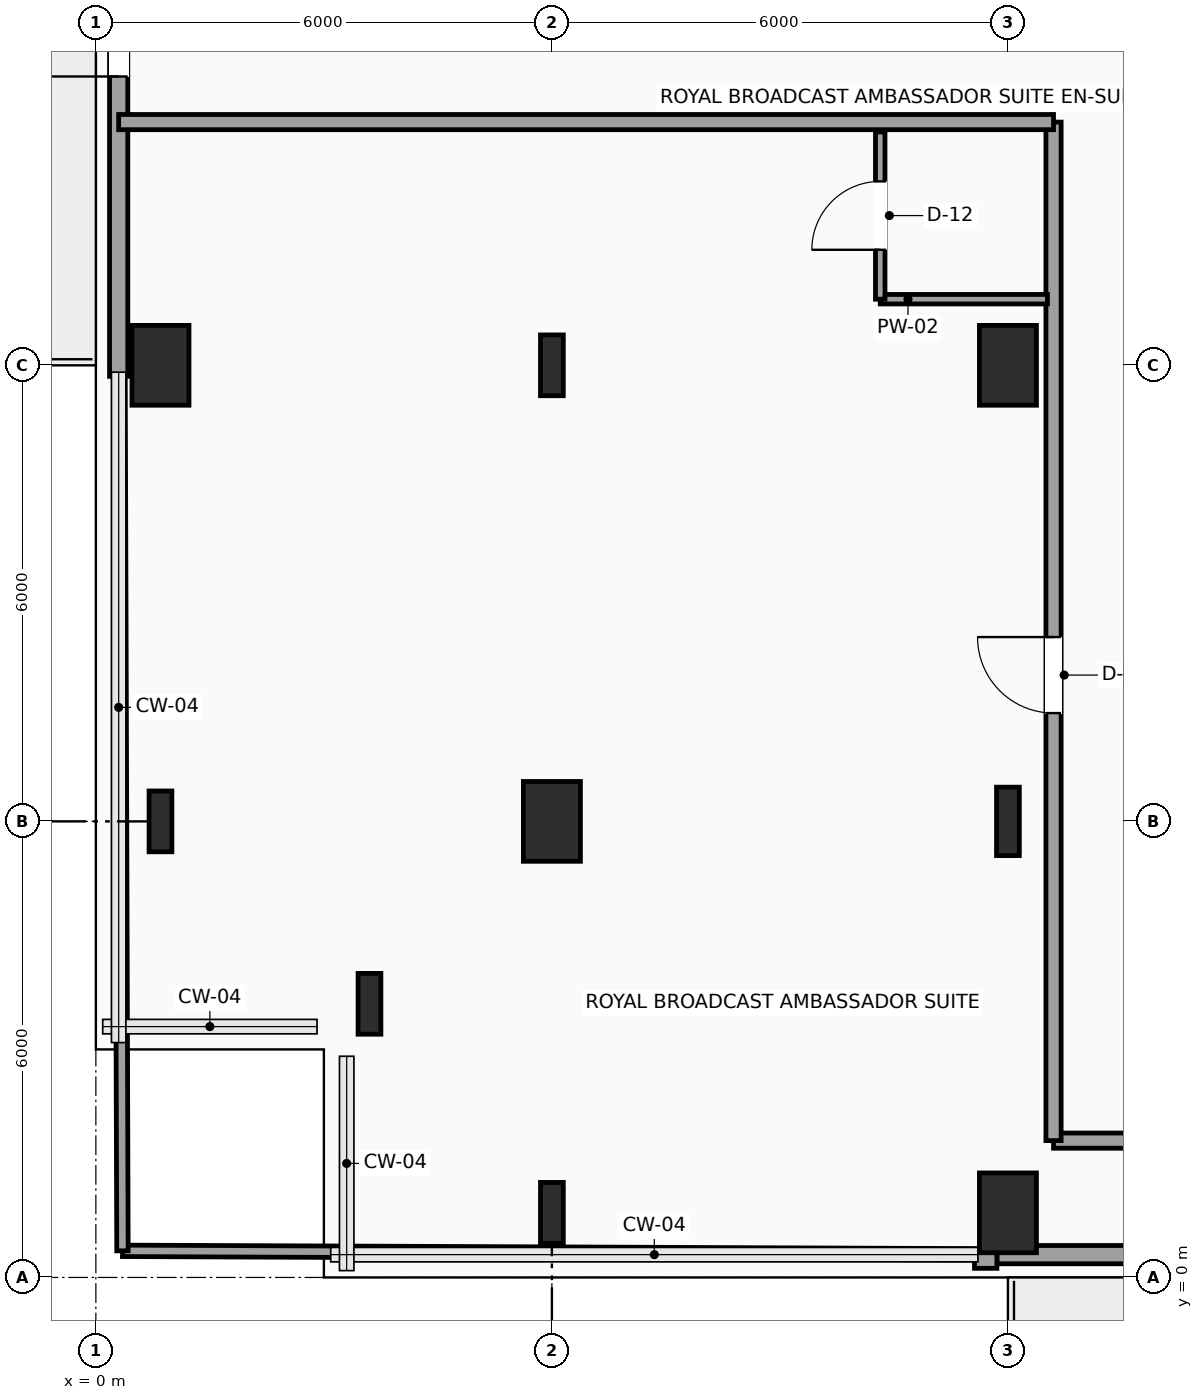
"""IFC4 building model, lengths in metres.
Left out: names, types, materials, properties, quantities, classifications, styles, units other than length and angle.
Written with IfcOpenShell. Run it as: python <this file> out.ifc"""

import sys

from ifc_helpers import new_model, si_unit, direction, frame, frame_2d, origin, origin_2d, place, context, subcontext, project, spatial, rectangle, i_section, extrude, element, fill, save


model = new_model("IFC4")
c1 = context("Model", 3, precision=1e-05, world=origin(), true_north=direction((0.0, 1.0)))
c2 = subcontext(c1, "Body", "Model", "MODEL_VIEW")
j1 = project(units=[si_unit("LENGTHUNIT", "METRE"), si_unit("PLANEANGLEUNIT", "RADIAN")], contexts=[c1])
p1 = place(None, origin())
s1 = spatial("IfcSite", under=j1, at=p1, CompositionType="ELEMENT")
p2 = place(p1, origin())
s2 = spatial("IfcBuilding", under=s1, at=p2, CompositionType="ELEMENT")
p3 = place(p2, frame((0.0, 0.0, 219.9)))
s3 = spatial("IfcBuildingStorey", under=s2, at=p3, CompositionType="ELEMENT", Elevation=219.9)
for number, where, z_axis, x_axis in (
    (1, (3.6, 3.6, 0.0), (0.0, 0.0, 1.0), (1.0, 0.0, 0.0)),
    (2, (0.85, 6.0, 0.0), (0.0, 0.0, 1.0), (1.0, 0.0, 0.0)),
):
    element("IfcColumn", number, at=place(p3, frame(where, z_axis=z_axis, x_axis=x_axis)), inside=s3, PredefinedType="COLUMN", context=c2, shape_type="SweptSolid", body=[
        extrude(i_section(OverallWidth=0.3, OverallDepth=0.8, WebThickness=0.018, FlangeThickness=0.033, FilletRadius=0.03, at=origin_2d()), origin(), (0.0, 0.0, 1.0), 3.75),
    ])
p4 = place(p3, frame((0.85, 12.0, 0.0), z_axis=(0.0, 0.0, 1.0), x_axis=(1.0, 0.0, 0.0)))
e3 = element("IfcColumn", 3, at=p4, inside=s3, PredefinedType="COLUMN", context=c2, shape_type="SweptSolid", body=[
    extrude(rectangle(XDim=0.75, YDim=1.05, at=origin_2d()), origin(), (0.0, 0.0, 1.0), 3.75),
])
p5 = place(p3, frame((6.0, 0.85, 0.0), z_axis=(0.0, 0.0, 1.0), x_axis=(1.0, 0.0, 0.0)))
e4 = element("IfcColumn", 4, at=p5, inside=s3, PredefinedType="COLUMN", context=c2, shape_type="SweptSolid", body=[
    extrude(i_section(OverallWidth=0.3, OverallDepth=0.8, WebThickness=0.018, FlangeThickness=0.033, FilletRadius=0.03, at=origin_2d()), origin(), (0.0, 0.0, 1.0), 3.75),
])
p6 = place(p3, frame((6.0, 6.0, 0.0), z_axis=(0.0, 0.0, 1.0), x_axis=(1.0, 0.0, 0.0)))
e5 = element("IfcColumn", 5, at=p6, inside=s3, PredefinedType="COLUMN", context=c2, shape_type="SweptSolid", body=[
    extrude(rectangle(XDim=0.75, YDim=1.05, at=origin_2d()), origin(), (0.0, 0.0, 1.0), 3.75),
])
p7 = place(p3, frame((6.0, 12.0, 0.0), z_axis=(0.0, 0.0, 1.0), x_axis=(1.0, 0.0, 0.0)))
e6 = element("IfcColumn", 6, at=p7, inside=s3, PredefinedType="COLUMN", context=c2, shape_type="SweptSolid", body=[
    extrude(i_section(OverallWidth=0.3, OverallDepth=0.8, WebThickness=0.018, FlangeThickness=0.033, FilletRadius=0.03, at=origin_2d()), origin(), (0.0, 0.0, 1.0), 3.75),
])
p8 = place(p3, frame((12.0, 0.85, 0.0), z_axis=(0.0, 0.0, 1.0), x_axis=(1.0, 0.0, 0.0)))
e7 = element("IfcColumn", 7, at=p8, inside=s3, PredefinedType="COLUMN", context=c2, shape_type="SweptSolid", body=[
    extrude(rectangle(XDim=0.75, YDim=1.05, at=origin_2d()), origin(), (0.0, 0.0, 1.0), 3.75),
])
p9 = place(p3, frame((12.0, 6.0, 0.0), z_axis=(0.0, 0.0, 1.0), x_axis=(1.0, 0.0, 0.0)))
e8 = element("IfcColumn", 8, at=p9, inside=s3, PredefinedType="COLUMN", context=c2, shape_type="SweptSolid", body=[
    extrude(i_section(OverallWidth=0.3, OverallDepth=0.9, WebThickness=0.019, FlangeThickness=0.035, FilletRadius=0.03, at=origin_2d()), origin(), (0.0, 0.0, 1.0), 3.75),
])
p10 = place(p3, frame((12.0, 12.0, 0.0), z_axis=(0.0, 0.0, 1.0), x_axis=(1.0, 0.0, 0.0)))
e9 = element("IfcColumn", 9, at=p10, inside=s3, PredefinedType="COLUMN", context=c2, shape_type="SweptSolid", body=[
    extrude(rectangle(XDim=0.75, YDim=1.05, at=origin_2d()), origin(), (0.0, 0.0, 1.0), 3.75),
])
p11 = place(p3, frame((21.145, 0.3, 0.0), z_axis=(0.0, 0.0, 1.0), x_axis=(-1.0, 0.0, 0.0)))
e10 = element("IfcWall", 10, at=p11, inside=s3, PredefinedType="SOLIDWALL", context=c2, shape_type="SweptSolid", body=[
    extrude(rectangle(XDim=9.29, YDim=0.24, at=frame_2d((4.645, 0.0))), origin(), (0.0, 0.0, 1.0), 3.54),
])
p12 = place(p11, frame((3.945, 0.0, 0.0)))
e11 = element("IfcOpeningElement", 11, at=p12, cuts=e10, PredefinedType="OPENING", context=c2, shape_type="SweptSolid", body=[
    extrude(rectangle(XDim=1.05, YDim=2.2, at=frame_2d((0.525, 1.1))), frame((0.0, 0.13, 0.0), z_axis=(0.0, -1.0, 0.0), x_axis=(1.0, 0.0, 0.0)), (0.0, 0.0, 1.0), 0.26),
])
p13 = place(p11, frame((5.345, 0.0, 0.85)))
e12 = element("IfcOpeningElement", 12, at=p13, cuts=e10, PredefinedType="OPENING", context=c2, shape_type="SweptSolid", body=[
    extrude(rectangle(XDim=2.1, YDim=2.2, at=frame_2d((1.05, 1.1))), frame((0.0, 0.13, 0.0), z_axis=(0.0, -1.0, 0.0), x_axis=(1.0, 0.0, 0.0)), (0.0, 0.0, 1.0), 0.26),
])
p14 = place(p3, frame((0.3, 11.855, 0.0), z_axis=(0.0, 0.0, 1.0), x_axis=(0.0, 1.0, 0.0)))
e13 = element("IfcWall", 13, at=p14, inside=s3, PredefinedType="SOLIDWALL", context=c2, shape_type="SweptSolid", body=[
    extrude(rectangle(XDim=9.29, YDim=0.24, at=frame_2d((4.645, 0.0))), origin(), (0.0, 0.0, 1.0), 3.54),
])
p15 = place(p14, frame((3.945, 0.0, 0.0)))
e14 = element("IfcOpeningElement", 14, at=p15, cuts=e13, PredefinedType="OPENING", context=c2, shape_type="SweptSolid", body=[
    extrude(rectangle(XDim=1.05, YDim=2.2, at=frame_2d((0.525, 1.1))), frame((0.0, 0.13, 0.0), z_axis=(0.0, -1.0, 0.0), x_axis=(1.0, 0.0, 0.0)), (0.0, 0.0, 1.0), 0.26),
])
p16 = place(p3, frame((11.855, 0.24, 0.0), z_axis=(0.0, 0.0, 1.0), x_axis=(-1.0, 0.0, 0.0)))
e15 = element("IfcWall", 15, at=p16, inside=s3, PredefinedType="SOLIDWALL", context=c2, shape_type="SweptSolid", body=[
    extrude(rectangle(XDim=0.295, YDim=0.24, at=frame_2d((0.147, 0.0))), origin(), (0.0, 0.0, 1.0), 3.54),
])
p17 = place(p3, frame((14.95, 1.8, 0.0), z_axis=(0.0, 0.0, 1.0), x_axis=(-1.0, 0.0, 0.0)))
e16 = element("IfcWall", 16, at=p17, inside=s3, PredefinedType="SOLIDWALL", context=c2, shape_type="SweptSolid", body=[
    extrude(rectangle(XDim=2.35, YDim=0.2, at=frame_2d((1.175, 0.0))), origin(), (0.0, 0.0, 1.0), 3.54),
])
p18 = place(p3, frame((12.6, 1.8, 0.0), z_axis=(0.0, 0.0, 1.0), x_axis=(0.0, 1.0, 0.0)))
e17 = element("IfcWall", 17, at=p18, inside=s3, PredefinedType="SOLIDWALL", context=c2, shape_type="SweptSolid", body=[
    extrude(rectangle(XDim=13.4, YDim=0.2, at=frame_2d((6.7, 0.0))), origin(), (0.0, 0.0, 1.0), 3.54),
])
p19 = place(p18, frame((5.625, 0.0, 0.0)))
e18 = element("IfcOpeningElement", 18, at=p19, cuts=e17, PredefinedType="OPENING", context=c2, shape_type="SweptSolid", body=[
    extrude(rectangle(XDim=1.0, YDim=2.2, at=frame_2d((0.5, 1.1))), frame((0.0, 0.11, 0.0), z_axis=(0.0, -1.0, 0.0), x_axis=(1.0, 0.0, 0.0)), (0.0, 0.0, 1.0), 0.22),
])
p20 = place(p3, frame((12.6, 15.2, 0.0), z_axis=(0.0, 0.0, 1.0), x_axis=(-1.0, 0.0, 0.0)))
e19 = element("IfcWall", 19, at=p20, inside=s3, PredefinedType="SOLIDWALL", context=c2, shape_type="SweptSolid", body=[
    extrude(rectangle(XDim=12.3, YDim=0.2, at=frame_2d((6.15, 0.0))), origin(), (0.0, 0.0, 1.0), 3.132),
])
p21 = place(p3, frame((0.35, 0.35, 0.0), z_axis=(0.0, 0.0, 1.0), x_axis=(0.999991617913, -0.004094398993, 0.0)))
e20 = element("IfcWall", 20, at=p21, inside=s3, PredefinedType="PARTITIONING", context=c2, shape_type="SweptSolid", body=[
    extrude(rectangle(XDim=11.21, YDim=0.15, at=frame_2d((5.605, 0.0))), origin(), (0.0, 0.0, 1.0), 3.54),
])
p22 = place(p3, frame((0.35, 0.35, 0.0), z_axis=(0.0, 0.0, 1.0), x_axis=(-0.003374057698, 0.999994307851, 0.0)))
e21 = element("IfcWall", 21, at=p22, inside=s3, PredefinedType="PARTITIONING", context=c2, shape_type="SweptSolid", body=[
    extrude(rectangle(XDim=11.505, YDim=0.15, at=frame_2d((5.752, 0.0))), origin(), (0.0, 0.0, 1.0), 3.54),
])
p23 = place(p3, frame((10.32, 12.87, 0.0), z_axis=(0.0, 0.0, 1.0), x_axis=(1.0, 0.0, 0.0)))
e22 = element("IfcWall", 22, at=p23, inside=s3, PredefinedType="PARTITIONING", context=c2, shape_type="SweptSolid", body=[
    extrude(rectangle(XDim=2.2, YDim=0.125, at=frame_2d((1.1, 0.0))), origin(), (0.0, 0.0, 1.0), 3.54),
])
p24 = place(p3, frame((10.32, 12.87, 0.0), z_axis=(0.0, 0.0, 1.0), x_axis=(0.0, 1.0, 0.0)))
e23 = element("IfcWall", 23, at=p24, inside=s3, PredefinedType="PARTITIONING", context=c2, shape_type="SweptSolid", body=[
    extrude(rectangle(XDim=2.2, YDim=0.125, at=frame_2d((1.1, 0.0))), origin(), (0.0, 0.0, 1.0), 3.54),
])
p25 = place(p24, frame((0.65, 0.0, 0.0)))
e24 = element("IfcOpeningElement", 24, at=p25, cuts=e23, PredefinedType="OPENING", context=c2, shape_type="SweptSolid", body=[
    extrude(rectangle(XDim=0.9, YDim=2.1, at=frame_2d((0.45, 1.05))), frame((0.0, 0.073, 0.0), z_axis=(0.0, -1.0, 0.0), x_axis=(1.0, 0.0, 0.0)), (0.0, 0.0, 1.0), 0.145),
])
p26 = place(p15, origin())
e25 = element("IfcDoor", 25, at=p26, inside=s3, OperationType="SINGLE_SWING_LEFT", PredefinedType="DOOR", context=c2, shape_type="SweptSolid", body=[
    extrude(rectangle(XDim=1.05, YDim=2.2, at=frame_2d((0.525, 1.1))), frame((0.0, 0.025, 0.0), z_axis=(0.0, -1.0, 0.0), x_axis=(1.0, 0.0, 0.0)), (0.0, 0.0, 1.0), 0.05),
])
fill(e14, e25)
p27 = place(p19, origin())
e26 = element("IfcDoor", 26, at=p27, inside=s3, OperationType="SINGLE_SWING_RIGHT", PredefinedType="DOOR", context=c2, shape_type="SweptSolid", body=[
    extrude(rectangle(XDim=1.0, YDim=2.2, at=frame_2d((0.5, 1.1))), frame((0.0, 0.025, 0.0), z_axis=(0.0, -1.0, 0.0), x_axis=(1.0, 0.0, 0.0)), (0.0, 0.0, 1.0), 0.05),
])
fill(e18, e26)
p28 = place(p25, origin())
e27 = element("IfcDoor", 27, at=p28, inside=s3, OperationType="SINGLE_SWING_LEFT", PredefinedType="DOOR", context=c2, shape_type="SweptSolid", body=[
    extrude(rectangle(XDim=0.9, YDim=2.1, at=frame_2d((0.45, 1.05))), frame((0.0, 0.025, 0.0), z_axis=(0.0, -1.0, 0.0), x_axis=(1.0, 0.0, 0.0)), (0.0, 0.0, 1.0), 0.05),
])
fill(e24, e27)
save(model, sys.argv[1])
